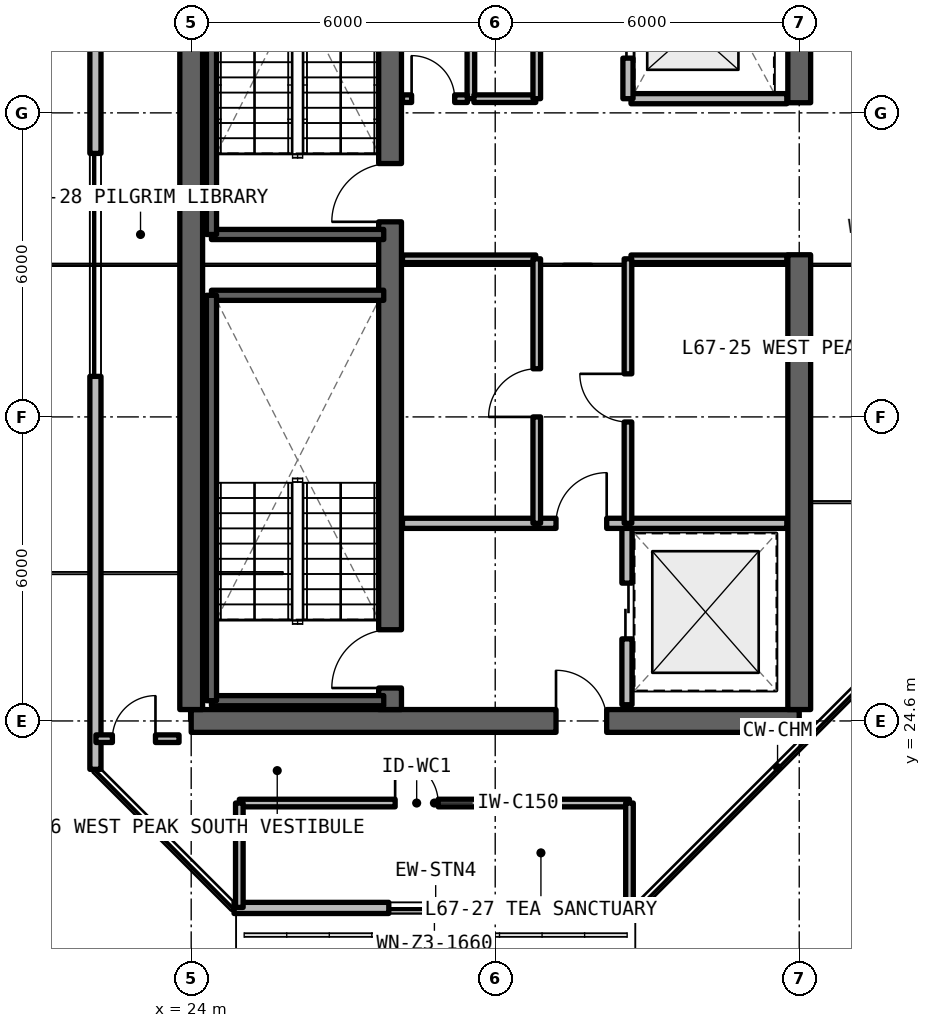
"""IFC4 building model, lengths in metres.
Left out: names, types, materials, properties, quantities, classifications, styles, units other than length and angle.
Written with IfcOpenShell. Run it as: python <this file> out.ifc"""

import sys

from ifc_helpers import new_model, si_unit, direction, frame, frame_2d, origin, place, context, subcontext, project, spatial, rectangle, extrude, element, fill, save


model = new_model("IFC4")
c1 = context("Model", 3, precision=1e-05, world=origin(), true_north=direction((0.0, 1.0)))
c2 = subcontext(c1, "Body", "Model", "MODEL_VIEW")
j1 = project(units=[si_unit("LENGTHUNIT", "METRE"), si_unit("PLANEANGLEUNIT", "RADIAN")], contexts=[c1])
p1 = place(None, origin())
s1 = spatial("IfcSite", under=j1, at=p1, CompositionType="ELEMENT")
p2 = place(p1, origin())
s2 = spatial("IfcBuilding", under=s1, at=p2, CompositionType="ELEMENT")
p3 = place(p2, frame((0.0, 0.0, 239.25)))
s3 = spatial("IfcBuildingStorey", under=s2, at=p3, CompositionType="ELEMENT", Elevation=239.25)
p4 = place(p3, frame((24.0, 24.6, 0.0), z_axis=(0.0, 0.0, 1.0), x_axis=(1.0, 0.0, 0.0)))
e1 = element("IfcWall", 1, at=p4, inside=s3, PredefinedType="SHEAR", context=c2, shape_type="SweptSolid", body=[
    extrude(rectangle(XDim=12.0, YDim=0.45, at=frame_2d((6.0, 0.0))), origin(), (0.0, 0.0, 1.0), 3.3),
])
p5 = place(p4, frame((7.2, 0.0, 0.0)))
e2 = element("IfcOpeningElement", 2, at=p5, cuts=e1, PredefinedType="OPENING", context=c2, shape_type="SweptSolid", body=[
    extrude(rectangle(XDim=1.0, YDim=2.15, at=frame_2d((0.5, 1.075))), frame((0.0, 0.235, 0.0), z_axis=(0.0, -1.0, 0.0), x_axis=(1.0, 0.0, 0.0)), (0.0, 0.0, 1.0), 0.47),
])
p6 = place(p3, frame((24.0, 24.825, 0.0), z_axis=(0.0, 0.0, 1.0), x_axis=(0.0, 1.0, 0.0)))
e3 = element("IfcWall", 3, at=p6, inside=s3, PredefinedType="SHEAR", context=c2, shape_type="SweptSolid", body=[
    extrude(rectangle(XDim=17.55, YDim=0.45, at=frame_2d((8.775, 0.0))), origin(), (0.0, 0.0, 1.0), 3.3),
])
p7 = place(p3, frame((36.0, 24.825, 0.0), z_axis=(0.0, 0.0, 1.0), x_axis=(0.0, 1.0, 0.0)))
e4 = element("IfcWall", 4, at=p7, inside=s3, PredefinedType="SHEAR", context=c2, shape_type="SweptSolid", body=[
    extrude(rectangle(XDim=8.975, YDim=0.45, at=frame_2d((4.488, 0.0))), origin(), (0.0, 0.0, 1.0), 3.3),
])
p8 = place(p3, frame((36.0, 36.8, 0.0), z_axis=(0.0, 0.0, 1.0), x_axis=(0.0, 1.0, 0.0)))
e5 = element("IfcWall", 5, at=p8, inside=s3, PredefinedType="SHEAR", context=c2, shape_type="SweptSolid", body=[
    extrude(rectangle(XDim=5.575, YDim=0.45, at=frame_2d((2.788, 0.0))), origin(), (0.0, 0.0, 1.0), 3.3),
])
p9 = place(p3, frame((27.925, 24.825, 0.0), z_axis=(0.0, 0.0, 1.0), x_axis=(0.0, 1.0, 0.0)))
e6 = element("IfcWall", 6, at=p9, inside=s3, PredefinedType="SHEAR", context=c2, shape_type="SweptSolid", body=[
    extrude(rectangle(XDim=17.55, YDim=0.45, at=frame_2d((8.775, 0.0))), origin(), (0.0, 0.0, 1.0), 3.3),
])
p10 = place(p9, frame((0.425, 0.0, 0.0)))
e7 = element("IfcOpeningElement", 7, at=p10, cuts=e6, PredefinedType="OPENING", context=c2, shape_type="SweptSolid", body=[
    extrude(rectangle(XDim=1.15, YDim=2.15, at=frame_2d((0.575, 1.075))), frame((0.0, 0.235, 0.0), z_axis=(0.0, -1.0, 0.0), x_axis=(1.0, 0.0, 0.0)), (0.0, 0.0, 1.0), 0.47),
])
p11 = place(p9, frame((9.625, 0.0, 0.0)))
e8 = element("IfcOpeningElement", 8, at=p11, cuts=e6, PredefinedType="OPENING", context=c2, shape_type="SweptSolid", body=[
    extrude(rectangle(XDim=1.15, YDim=2.15, at=frame_2d((0.575, 1.075))), frame((0.0, 0.235, 0.0), z_axis=(0.0, -1.0, 0.0), x_axis=(1.0, 0.0, 0.0)), (0.0, 0.0, 1.0), 0.47),
])
p12 = place(p3, frame((24.846, 20.91, 0.0), z_axis=(0.0, 0.0, 1.0), x_axis=(1.0, 0.0, 0.0)))
e9 = element("IfcWall", 9, at=p12, inside=s3, PredefinedType="SOLIDWALL", context=c2, shape_type="SweptSolid", body=[
    extrude(rectangle(XDim=7.959, YDim=0.22, at=frame_2d((3.979, 0.0))), origin(), (0.0, 0.0, 1.0), 3.08),
])
p13 = place(p12, frame((3.054, 0.0, 0.78)))
e10 = element("IfcOpeningElement", 10, at=p13, cuts=e9, PredefinedType="OPENING", context=c2, shape_type="SweptSolid", body=[
    extrude(rectangle(XDim=1.8, YDim=1.66, at=frame_2d((0.9, 0.83))), frame((0.0, 0.12, 0.0), z_axis=(0.0, -1.0, 0.0), x_axis=(1.0, 0.0, 0.0)), (0.0, 0.0, 1.0), 0.24),
])
p14 = place(p3, frame((22.11, 43.554, 0.0), z_axis=(0.0, 0.0, 1.0), x_axis=(0.0, -1.0, 0.0)))
e11 = element("IfcWall", 11, at=p14, inside=s3, PredefinedType="SOLIDWALL", context=c2, shape_type="SweptSolid", body=[
    extrude(rectangle(XDim=19.909, YDim=0.22, at=frame_2d((9.955, 0.0))), origin(), (0.0, 0.0, 1.0), 3.08),
])
p15 = place(p14, frame((7.754, 0.0, 0.78)))
e12 = element("IfcOpeningElement", 12, at=p15, cuts=e11, PredefinedType="OPENING", context=c2, shape_type="SweptSolid", body=[
    extrude(rectangle(XDim=4.4, YDim=1.66, at=frame_2d((2.2, 0.83))), frame((0.0, 0.12, 0.0), z_axis=(0.0, -1.0, 0.0), x_axis=(1.0, 0.0, 0.0)), (0.0, 0.0, 1.0), 0.24),
])
p16 = place(p3, frame((32.6, 24.92, 0.0), z_axis=(0.0, 0.0, 1.0), x_axis=(0.0, 1.0, 0.0)))
e13 = element("IfcWall", 13, at=p16, inside=s3, PredefinedType="SOLIDWALL", context=c2, shape_type="SweptSolid", body=[
    extrude(rectangle(XDim=3.58, YDim=0.2, at=frame_2d((1.79, 0.0))), origin(), (0.0, 0.0, 1.0), 2.35),
])
p17 = place(p16, frame((1.3, 0.0, 0.0)))
e14 = element("IfcOpeningElement", 14, at=p17, cuts=e13, PredefinedType="OPENING", context=c2, shape_type="SweptSolid", body=[
    extrude(rectangle(XDim=1.1, YDim=2.2, at=frame_2d((0.55, 1.1))), frame((0.0, 0.11, 0.0), z_axis=(0.0, -1.0, 0.0), x_axis=(1.0, 0.0, 0.0)), (0.0, 0.0, 1.0), 0.22),
])
p18 = place(p3, frame((28.17, 28.5, 0.0), z_axis=(0.0, 0.0, 1.0), x_axis=(1.0, 0.0, 0.0)))
e15 = element("IfcWall", 15, at=p18, inside=s3, PredefinedType="SOLIDWALL", context=c2, shape_type="SweptSolid", body=[
    extrude(rectangle(XDim=7.585, YDim=0.2, at=frame_2d((3.792, 0.0))), origin(), (0.0, 0.0, 1.0), 2.35),
])
p19 = place(p18, frame((3.03, 0.0, 0.0)))
e16 = element("IfcOpeningElement", 16, at=p19, cuts=e15, PredefinedType="OPENING", context=c2, shape_type="SweptSolid", body=[
    extrude(rectangle(XDim=1.0, YDim=2.15, at=frame_2d((0.5, 1.075))), frame((0.0, 0.11, 0.0), z_axis=(0.0, -1.0, 0.0), x_axis=(1.0, 0.0, 0.0)), (0.0, 0.0, 1.0), 0.22),
])
p20 = place(p3, frame((28.17, 33.72, 0.0), z_axis=(0.0, 0.0, 1.0), x_axis=(1.0, 0.0, 0.0)))
e17 = element("IfcWall", 17, at=p20, inside=s3, PredefinedType="SOLIDWALL", context=c2, shape_type="SweptSolid", body=[
    extrude(rectangle(XDim=2.63, YDim=0.15, at=frame_2d((1.315, 0.0))), origin(), (0.0, 0.0, 1.0), 2.35),
])
p21 = place(p3, frame((30.82, 28.5, 0.0), z_axis=(0.0, 0.0, 1.0), x_axis=(0.0, 1.0, 0.0)))
e18 = element("IfcWall", 18, at=p21, inside=s3, PredefinedType="SOLIDWALL", context=c2, shape_type="SweptSolid", body=[
    extrude(rectangle(XDim=5.22, YDim=0.15, at=frame_2d((2.61, 0.0))), origin(), (0.0, 0.0, 1.0), 2.35),
])
p22 = place(p21, frame((2.1, 0.0, 0.0)))
e19 = element("IfcOpeningElement", 19, at=p22, cuts=e18, PredefinedType="OPENING", context=c2, shape_type="SweptSolid", body=[
    extrude(rectangle(XDim=0.95, YDim=2.15, at=frame_2d((0.475, 1.075))), frame((0.0, 0.085, 0.0), z_axis=(0.0, -1.0, 0.0), x_axis=(1.0, 0.0, 0.0)), (0.0, 0.0, 1.0), 0.17),
])
p23 = place(p3, frame((32.68, 33.72, 0.0), z_axis=(0.0, 0.0, 1.0), x_axis=(1.0, 0.0, 0.0)))
e20 = element("IfcWall", 20, at=p23, inside=s3, PredefinedType="SOLIDWALL", context=c2, shape_type="SweptSolid", body=[
    extrude(rectangle(XDim=3.075, YDim=0.15, at=frame_2d((1.538, 0.0))), origin(), (0.0, 0.0, 1.0), 2.35),
])
p24 = place(p3, frame((32.62, 28.5, 0.0), z_axis=(0.0, 0.0, 1.0), x_axis=(0.0, 1.0, 0.0)))
e21 = element("IfcWall", 21, at=p24, inside=s3, PredefinedType="SOLIDWALL", context=c2, shape_type="SweptSolid", body=[
    extrude(rectangle(XDim=5.22, YDim=0.15, at=frame_2d((2.61, 0.0))), origin(), (0.0, 0.0, 1.0), 2.35),
])
p25 = place(p24, frame((2.0, 0.0, 0.0)))
e22 = element("IfcOpeningElement", 22, at=p25, cuts=e21, PredefinedType="OPENING", context=c2, shape_type="SweptSolid", body=[
    extrude(rectangle(XDim=0.95, YDim=2.15, at=frame_2d((0.475, 1.075))), frame((0.0, 0.085, 0.0), z_axis=(0.0, -1.0, 0.0), x_axis=(1.0, 0.0, 0.0)), (0.0, 0.0, 1.0), 0.17),
])
p26 = place(p3, frame((29.52, 36.88, 0.0), z_axis=(0.0, 0.0, 1.0), x_axis=(0.0, 1.0, 0.0)))
e23 = element("IfcWall", 23, at=p26, inside=s3, PredefinedType="SOLIDWALL", context=c2, shape_type="SweptSolid", body=[
    extrude(rectangle(XDim=5.42, YDim=0.15, at=frame_2d((2.71, 0.0))), origin(), (0.0, 0.0, 1.0), 2.35),
])
p27 = place(p3, frame((28.17, 36.88, 0.0), z_axis=(0.0, 0.0, 1.0), x_axis=(1.0, 0.0, 0.0)))
e24 = element("IfcWall", 24, at=p27, inside=s3, PredefinedType="SOLIDWALL", context=c2, shape_type="SweptSolid", body=[
    extrude(rectangle(XDim=1.28, YDim=0.15, at=frame_2d((0.64, 0.0))), origin(), (0.0, 0.0, 1.0), 2.35),
])
p28 = place(p27, frame((0.18, 0.0, 0.0)))
e25 = element("IfcOpeningElement", 25, at=p28, cuts=e24, PredefinedType="OPENING", context=c2, shape_type="SweptSolid", body=[
    extrude(rectangle(XDim=0.85, YDim=2.1, at=frame_2d((0.425, 1.05))), frame((0.0, 0.085, 0.0), z_axis=(0.0, -1.0, 0.0), x_axis=(1.0, 0.0, 0.0)), (0.0, 0.0, 1.0), 0.17),
])
p29 = place(p3, frame((29.58, 36.88, 0.0), z_axis=(0.0, 0.0, 1.0), x_axis=(1.0, 0.0, 0.0)))
e26 = element("IfcWall", 26, at=p29, inside=s3, PredefinedType="SOLIDWALL", context=c2, shape_type="SweptSolid", body=[
    extrude(rectangle(XDim=1.22, YDim=0.15, at=frame_2d((0.61, 0.0))), origin(), (0.0, 0.0, 1.0), 2.35),
])
p30 = place(p3, frame((30.82, 36.88, 0.0), z_axis=(0.0, 0.0, 1.0), x_axis=(0.0, 1.0, 0.0)))
e27 = element("IfcWall", 27, at=p30, inside=s3, PredefinedType="SOLIDWALL", context=c2, shape_type="SweptSolid", body=[
    extrude(rectangle(XDim=5.42, YDim=0.15, at=frame_2d((2.71, 0.0))), origin(), (0.0, 0.0, 1.0), 2.35),
])
p31 = place(p30, frame((2.1, 0.0, 0.0)))
e28 = element("IfcOpeningElement", 28, at=p31, cuts=e27, PredefinedType="OPENING", context=c2, shape_type="SweptSolid", body=[
    extrude(rectangle(XDim=0.95, YDim=2.15, at=frame_2d((0.475, 1.075))), frame((0.0, 0.085, 0.0), z_axis=(0.0, -1.0, 0.0), x_axis=(1.0, 0.0, 0.0)), (0.0, 0.0, 1.0), 0.17),
])
p32 = place(p3, frame((32.68, 36.88, 0.0), z_axis=(0.0, 0.0, 1.0), x_axis=(1.0, 0.0, 0.0)))
e29 = element("IfcWall", 29, at=p32, inside=s3, PredefinedType="SOLIDWALL", context=c2, shape_type="SweptSolid", body=[
    extrude(rectangle(XDim=3.075, YDim=0.2, at=frame_2d((1.538, 0.0))), origin(), (0.0, 0.0, 1.0), 2.35),
])
p33 = place(p3, frame((32.62, 36.88, 0.0), z_axis=(0.0, 0.0, 1.0), x_axis=(0.0, 1.0, 0.0)))
e30 = element("IfcWall", 30, at=p33, inside=s3, PredefinedType="SOLIDWALL", context=c2, shape_type="SweptSolid", body=[
    extrude(rectangle(XDim=5.42, YDim=0.2, at=frame_2d((2.71, 0.0))), origin(), (0.0, 0.0, 1.0), 2.35),
])
p34 = place(p33, frame((0.8, 0.0, 0.0)))
e31 = element("IfcOpeningElement", 31, at=p34, cuts=e30, PredefinedType="OPENING", context=c2, shape_type="SweptSolid", body=[
    extrude(rectangle(XDim=1.1, YDim=2.2, at=frame_2d((0.55, 1.1))), frame((0.0, 0.11, 0.0), z_axis=(0.0, -1.0, 0.0), x_axis=(1.0, 0.0, 0.0)), (0.0, 0.0, 1.0), 0.22),
])
p35 = place(p33, frame((3.3, 0.0, 0.0)))
e32 = element("IfcOpeningElement", 32, at=p35, cuts=e30, PredefinedType="OPENING", context=c2, shape_type="SweptSolid", body=[
    extrude(rectangle(XDim=1.1, YDim=2.2, at=frame_2d((0.55, 1.1))), frame((0.0, 0.11, 0.0), z_axis=(0.0, -1.0, 0.0), x_axis=(1.0, 0.0, 0.0)), (0.0, 0.0, 1.0), 0.22),
])
p36 = place(p3, frame((24.95, 22.98, 0.0), z_axis=(0.0, 0.0, 1.0), x_axis=(1.0, 0.0, 0.0)))
e33 = element("IfcWall", 33, at=p36, inside=s3, PredefinedType="SOLIDWALL", context=c2, shape_type="SweptSolid", body=[
    extrude(rectangle(XDim=7.7, YDim=0.15, at=frame_2d((3.85, 0.0))), origin(), (0.0, 0.0, 1.0), 2.35),
])
p37 = place(p36, frame((3.075, 0.0, 0.0)))
e34 = element("IfcOpeningElement", 34, at=p37, cuts=e33, PredefinedType="OPENING", context=c2, shape_type="SweptSolid", body=[
    extrude(rectangle(XDim=0.85, YDim=2.1, at=frame_2d((0.425, 1.05))), frame((0.0, 0.085, 0.0), z_axis=(0.0, -1.0, 0.0), x_axis=(1.0, 0.0, 0.0)), (0.0, 0.0, 1.0), 0.17),
])
for number, where, z_axis, x_axis in (
    (35, (24.95, 20.92, 0.0), (0.0, 0.0, 1.0), (0.0, 1.0, 0.0)),
    (36, (32.65, 20.92, 0.0), (0.0, 0.0, 1.0), (0.0, 1.0, 0.0)),
):
    element("IfcWall", number, at=place(p3, frame(where, z_axis=z_axis, x_axis=x_axis)), inside=s3, PredefinedType="SOLIDWALL", context=c2, shape_type="SweptSolid", body=[
        extrude(rectangle(XDim=2.06, YDim=0.15, at=frame_2d((1.03, 0.0))), origin(), (0.0, 0.0, 1.0), 2.35),
    ])
p38 = place(p3, frame((22.12, 24.25, 0.0), z_axis=(0.0, 0.0, 1.0), x_axis=(1.0, 0.0, 0.0)))
e37 = element("IfcWall", 37, at=p38, inside=s3, PredefinedType="SOLIDWALL", context=c2, shape_type="SweptSolid", body=[
    extrude(rectangle(XDim=1.64, YDim=0.15, at=frame_2d((0.82, 0.0))), origin(), (0.0, 0.0, 1.0), 2.35),
])
p39 = place(p38, frame((0.325, 0.0, 0.0)))
e38 = element("IfcOpeningElement", 38, at=p39, cuts=e37, PredefinedType="OPENING", context=c2, shape_type="SweptSolid", body=[
    extrude(rectangle(XDim=0.85, YDim=2.1, at=frame_2d((0.425, 1.05))), frame((0.0, 0.085, 0.0), z_axis=(0.0, -1.0, 0.0), x_axis=(1.0, 0.0, 0.0)), (0.0, 0.0, 1.0), 0.17),
])
for number, where, z_axis, x_axis in (
    (39, (24.4, 25.0, 0.0), (0.0, 0.0, 1.0), (1.0, 0.0, 0.0)),
    (40, (27.8, 33.0, 0.0), (0.0, 0.0, 1.0), (-1.0, 0.0, 0.0)),
):
    element("IfcWall", number, at=place(p3, frame(where, z_axis=z_axis, x_axis=x_axis)), inside=s3, PredefinedType="SOLIDWALL", context=c2, shape_type="SweptSolid", body=[
        extrude(rectangle(XDim=3.4, YDim=0.2, at=frame_2d((1.7, 0.0))), origin(), (0.0, 0.0, 1.0), 3.3),
    ])
p40 = place(p3, frame((24.4, 33.0, 0.0), z_axis=(0.0, 0.0, 1.0), x_axis=(0.0, -1.0, 0.0)))
e41 = element("IfcWall", 41, at=p40, inside=s3, PredefinedType="SOLIDWALL", context=c2, shape_type="SweptSolid", body=[
    extrude(rectangle(XDim=8.0, YDim=0.2, at=frame_2d((4.0, 0.0))), origin(), (0.0, 0.0, 1.0), 3.3),
])
p41 = place(p3, frame((24.4, 34.2, 0.0), z_axis=(0.0, 0.0, 1.0), x_axis=(1.0, 0.0, 0.0)))
e42 = element("IfcWall", 42, at=p41, inside=s3, PredefinedType="SOLIDWALL", context=c2, shape_type="SweptSolid", body=[
    extrude(rectangle(XDim=3.4, YDim=0.2, at=frame_2d((1.7, 0.0))), origin(), (0.0, 0.0, 1.0), 3.3),
])
p42 = place(p3, frame((24.4, 42.2, 0.0), z_axis=(0.0, 0.0, 1.0), x_axis=(0.0, -1.0, 0.0)))
e43 = element("IfcWall", 43, at=p42, inside=s3, PredefinedType="SOLIDWALL", context=c2, shape_type="SweptSolid", body=[
    extrude(rectangle(XDim=8.0, YDim=0.2, at=frame_2d((4.0, 0.0))), origin(), (0.0, 0.0, 1.0), 3.3),
])
p43 = place(p13, origin())
e44 = element("IfcWindow", 44, at=p43, inside=s3, PartitioningType="SINGLE_PANEL", PredefinedType="WINDOW", context=c2, shape_type="SweptSolid", body=[
    extrude(rectangle(XDim=1.8, YDim=1.66, at=frame_2d((0.9, 0.83))), frame((0.0, 0.03, 0.0), z_axis=(0.0, -1.0, 0.0), x_axis=(1.0, 0.0, 0.0)), (0.0, 0.0, 1.0), 0.06),
])
fill(e10, e44)
p44 = place(p15, origin())
e45 = element("IfcWindow", 45, at=p44, inside=s3, PartitioningType="SINGLE_PANEL", PredefinedType="WINDOW", context=c2, shape_type="SweptSolid", body=[
    extrude(rectangle(XDim=4.4, YDim=1.66, at=frame_2d((2.2, 0.83))), frame((0.0, 0.03, 0.0), z_axis=(0.0, -1.0, 0.0), x_axis=(1.0, 0.0, 0.0)), (0.0, 0.0, 1.0), 0.06),
])
fill(e12, e45)
p45 = place(p17, origin())
e46 = element("IfcDoor", 46, at=p45, inside=s3, OperationType="SLIDING_TO_LEFT", PredefinedType="DOOR", context=c2, shape_type="SweptSolid", body=[
    extrude(rectangle(XDim=1.1, YDim=2.2, at=frame_2d((0.55, 1.1))), frame((0.0, 0.025, 0.0), z_axis=(0.0, -1.0, 0.0), x_axis=(1.0, 0.0, 0.0)), (0.0, 0.0, 1.0), 0.05),
])
fill(e14, e46)
p46 = place(p19, origin())
e47 = element("IfcDoor", 47, at=p46, inside=s3, OperationType="SINGLE_SWING_RIGHT", PredefinedType="DOOR", context=c2, shape_type="SweptSolid", body=[
    extrude(rectangle(XDim=1.0, YDim=2.15, at=frame_2d((0.5, 1.075))), frame((0.0, 0.025, 0.0), z_axis=(0.0, -1.0, 0.0), x_axis=(1.0, 0.0, 0.0)), (0.0, 0.0, 1.0), 0.05),
])
fill(e16, e47)
p47 = place(p22, origin())
e48 = element("IfcDoor", 48, at=p47, inside=s3, OperationType="SINGLE_SWING_LEFT", PredefinedType="DOOR", context=c2, shape_type="SweptSolid", body=[
    extrude(rectangle(XDim=0.95, YDim=2.15, at=frame_2d((0.475, 1.075))), frame((0.0, 0.025, 0.0), z_axis=(0.0, -1.0, 0.0), x_axis=(1.0, 0.0, 0.0)), (0.0, 0.0, 1.0), 0.05),
])
fill(e19, e48)
p48 = place(p25, origin())
e49 = element("IfcDoor", 49, at=p48, inside=s3, OperationType="SINGLE_SWING_RIGHT", PredefinedType="DOOR", context=c2, shape_type="SweptSolid", body=[
    extrude(rectangle(XDim=0.95, YDim=2.15, at=frame_2d((0.475, 1.075))), frame((0.0, 0.025, 0.0), z_axis=(0.0, -1.0, 0.0), x_axis=(1.0, 0.0, 0.0)), (0.0, 0.0, 1.0), 0.05),
])
fill(e22, e49)
p49 = place(p28, origin())
e50 = element("IfcDoor", 50, at=p49, inside=s3, OperationType="SINGLE_SWING_LEFT", PredefinedType="DOOR", context=c2, shape_type="SweptSolid", body=[
    extrude(rectangle(XDim=0.85, YDim=2.1, at=frame_2d((0.425, 1.05))), frame((0.0, 0.025, 0.0), z_axis=(0.0, -1.0, 0.0), x_axis=(1.0, 0.0, 0.0)), (0.0, 0.0, 1.0), 0.05),
])
fill(e25, e50)
p50 = place(p34, origin())
e51 = element("IfcDoor", 51, at=p50, inside=s3, OperationType="SLIDING_TO_LEFT", PredefinedType="DOOR", context=c2, shape_type="SweptSolid", body=[
    extrude(rectangle(XDim=1.1, YDim=2.2, at=frame_2d((0.55, 1.1))), frame((0.0, 0.025, 0.0), z_axis=(0.0, -1.0, 0.0), x_axis=(1.0, 0.0, 0.0)), (0.0, 0.0, 1.0), 0.05),
])
fill(e31, e51)
p51 = place(p37, origin())
e52 = element("IfcDoor", 52, at=p51, inside=s3, OperationType="SINGLE_SWING_LEFT", PredefinedType="DOOR", context=c2, shape_type="SweptSolid", body=[
    extrude(rectangle(XDim=0.85, YDim=2.1, at=frame_2d((0.425, 1.05))), frame((0.0, 0.025, 0.0), z_axis=(0.0, -1.0, 0.0), x_axis=(1.0, 0.0, 0.0)), (0.0, 0.0, 1.0), 0.05),
])
fill(e34, e52)
p52 = place(p39, origin())
e53 = element("IfcDoor", 53, at=p52, inside=s3, OperationType="SINGLE_SWING_RIGHT", PredefinedType="DOOR", context=c2, shape_type="SweptSolid", body=[
    extrude(rectangle(XDim=0.85, YDim=2.1, at=frame_2d((0.425, 1.05))), frame((0.0, 0.025, 0.0), z_axis=(0.0, -1.0, 0.0), x_axis=(1.0, 0.0, 0.0)), (0.0, 0.0, 1.0), 0.05),
])
fill(e38, e53)
p53 = place(p10, origin())
e54 = element("IfcDoor", 54, at=p53, inside=s3, OperationType="SINGLE_SWING_RIGHT", PredefinedType="DOOR", context=c2, shape_type="SweptSolid", body=[
    extrude(rectangle(XDim=1.15, YDim=2.15, at=frame_2d((0.575, 1.075))), frame((0.0, 0.025, 0.0), z_axis=(0.0, -1.0, 0.0), x_axis=(1.0, 0.0, 0.0)), (0.0, 0.0, 1.0), 0.05),
])
fill(e7, e54)
p54 = place(p11, origin())
e55 = element("IfcDoor", 55, at=p54, inside=s3, OperationType="SINGLE_SWING_LEFT", PredefinedType="DOOR", context=c2, shape_type="SweptSolid", body=[
    extrude(rectangle(XDim=1.15, YDim=2.15, at=frame_2d((0.575, 1.075))), frame((0.0, 0.025, 0.0), z_axis=(0.0, -1.0, 0.0), x_axis=(1.0, 0.0, 0.0)), (0.0, 0.0, 1.0), 0.05),
])
fill(e8, e55)
p55 = place(p5, origin())
e56 = element("IfcDoor", 56, at=p55, inside=s3, OperationType="SINGLE_SWING_LEFT", PredefinedType="DOOR", context=c2, shape_type="SweptSolid", body=[
    extrude(rectangle(XDim=1.0, YDim=2.15, at=frame_2d((0.5, 1.075))), frame((0.0, 0.025, 0.0), z_axis=(0.0, -1.0, 0.0), x_axis=(1.0, 0.0, 0.0)), (0.0, 0.0, 1.0), 0.05),
])
fill(e2, e56)
save(model, sys.argv[1])
